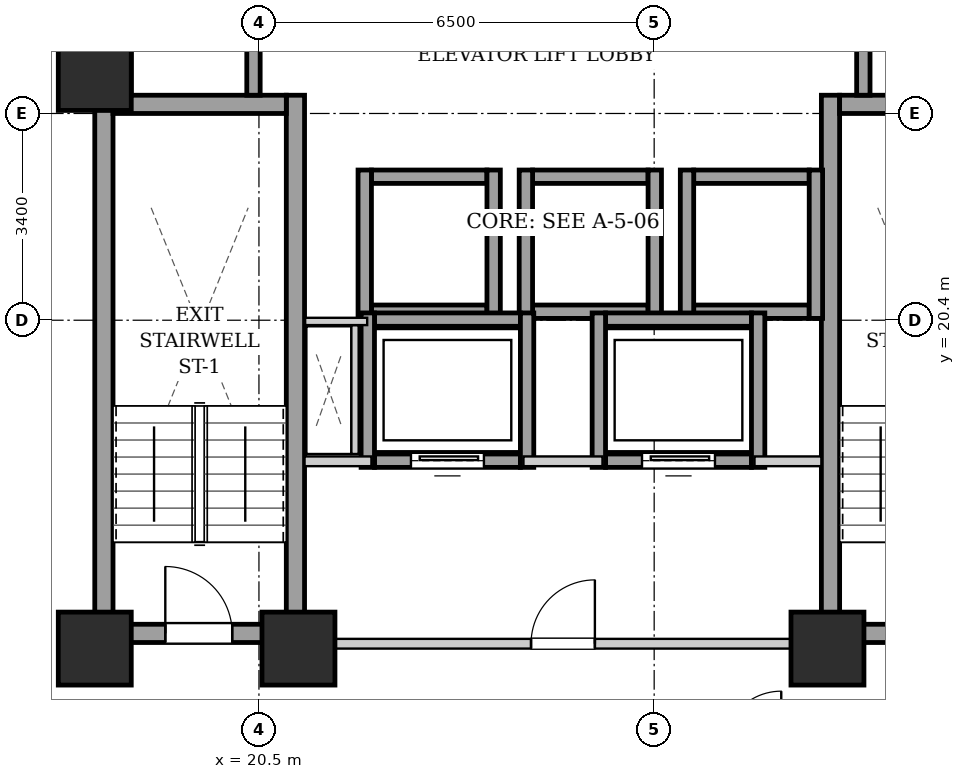
"""IFC4 building model, lengths in metres.
Left out: names, types, materials, properties, quantities, classifications, styles, units other than length and angle.
Written with IfcOpenShell. Run it as: python <this file> out.ifc"""

import sys

from ifc_helpers import new_model, si_unit, direction, frame, frame_2d, origin, origin_2d, place, context, subcontext, project, spatial, rectangle, extrude, element, fill, save


model = new_model("IFC4")
c1 = context("Model", 3, precision=1e-05, world=origin(), true_north=direction((0.0, 1.0)))
c2 = subcontext(c1, "Body", "Model", "MODEL_VIEW")
j1 = project(units=[si_unit("LENGTHUNIT", "METRE"), si_unit("PLANEANGLEUNIT", "RADIAN")], contexts=[c1])
p1 = place(None, origin())
s1 = spatial("IfcSite", under=j1, at=p1, CompositionType="ELEMENT")
p2 = place(p1, origin())
s2 = spatial("IfcBuilding", under=s1, at=p2, CompositionType="ELEMENT")
p3 = place(p2, frame((0.0, 0.0, 54.6)))
s3 = spatial("IfcBuildingStorey", under=s2, at=p3, CompositionType="ELEMENT", Elevation=54.6)
for number, where, z_axis, x_axis in (
    (1, (17.8, 15.0, 0.0), (0.0, 0.0, 1.0), (1.0, 0.0, 0.0)),
    (2, (21.15, 15.0, 0.0), (0.0, 0.0, 1.0), (1.0, 0.0, 0.0)),
    (3, (29.85, 15.0, 0.0), (0.0, 0.0, 1.0), (1.0, 0.0, 0.0)),
    (4, (17.8, 24.45, 0.0), (0.0, 0.0, 1.0), (1.0, 0.0, 0.0)),
):
    element("IfcColumn", number, at=place(p3, frame(where, z_axis=z_axis, x_axis=x_axis)), inside=s3, PredefinedType="COLUMN", context=c2, shape_type="SweptSolid", body=[
        extrude(rectangle(XDim=1.2, YDim=1.2, at=origin_2d()), origin(), (0.0, 0.0, 1.0), 3.2),
    ])
for number, where, z_axis, x_axis in (
    (5, (17.95, 15.1, 0.0), (0.0, 0.0, 1.0), (0.0, 1.0, 0.0)),
    (6, (21.1, 15.1, 0.0), (0.0, 0.0, 1.0), (0.0, 1.0, 0.0)),
):
    element("IfcWall", number, at=place(p3, frame(where, z_axis=z_axis, x_axis=x_axis)), inside=s3, PredefinedType="SHEAR", context=c2, shape_type="SweptSolid", body=[
        extrude(rectangle(XDim=9.0, YDim=0.3, at=frame_2d((4.5, 0.0))), origin(), (0.0, 0.0, 1.0), 2.94),
    ])
p4 = place(p3, frame((18.1, 23.95, 0.0), z_axis=(0.0, 0.0, 1.0), x_axis=(1.0, 0.0, 0.0)))
e7 = element("IfcWall", 7, at=p4, inside=s3, PredefinedType="SHEAR", context=c2, shape_type="SweptSolid", body=[
    extrude(rectangle(XDim=2.85, YDim=0.3, at=frame_2d((1.425, 0.0))), origin(), (0.0, 0.0, 1.0), 2.94),
])
p5 = place(p3, frame((18.1, 15.25, 0.0), z_axis=(0.0, 0.0, 1.0), x_axis=(1.0, 0.0, 0.0)))
e8 = element("IfcWall", 8, at=p5, inside=s3, PredefinedType="SHEAR", context=c2, shape_type="SweptSolid", body=[
    extrude(rectangle(XDim=2.85, YDim=0.3, at=frame_2d((1.425, 0.0))), origin(), (0.0, 0.0, 1.0), 2.94),
])
p6 = place(p5, frame((0.86, 0.0, 0.0)))
e9 = element("IfcOpeningElement", 9, at=p6, cuts=e8, PredefinedType="OPENING", context=c2, shape_type="SweptSolid", body=[
    extrude(rectangle(XDim=1.1, YDim=2.05, at=frame_2d((0.55, 1.025))), frame((0.0, 0.16, 0.0), z_axis=(0.0, -1.0, 0.0), x_axis=(1.0, 0.0, 0.0)), (0.0, 0.0, 1.0), 0.32),
])
p7 = place(p3, frame((29.9, 15.1, 0.0), z_axis=(0.0, 0.0, 1.0), x_axis=(0.0, 1.0, 0.0)))
e10 = element("IfcWall", 10, at=p7, inside=s3, PredefinedType="SHEAR", context=c2, shape_type="SweptSolid", body=[
    extrude(rectangle(XDim=9.0, YDim=0.3, at=frame_2d((4.5, 0.0))), origin(), (0.0, 0.0, 1.0), 2.94),
])
p8 = place(p3, frame((30.05, 23.95, 0.0), z_axis=(0.0, 0.0, 1.0), x_axis=(1.0, 0.0, 0.0)))
e11 = element("IfcWall", 11, at=p8, inside=s3, PredefinedType="SHEAR", context=c2, shape_type="SweptSolid", body=[
    extrude(rectangle(XDim=2.85, YDim=0.3, at=frame_2d((1.425, 0.0))), origin(), (0.0, 0.0, 1.0), 2.94),
])
p9 = place(p3, frame((30.05, 15.25, 0.0), z_axis=(0.0, 0.0, 1.0), x_axis=(1.0, 0.0, 0.0)))
e12 = element("IfcWall", 12, at=p9, inside=s3, PredefinedType="SHEAR", context=c2, shape_type="SweptSolid", body=[
    extrude(rectangle(XDim=2.85, YDim=0.3, at=frame_2d((1.425, 0.0))), origin(), (0.0, 0.0, 1.0), 2.94),
])
p10 = place(p9, frame((0.86, 0.0, 0.0)))
e13 = element("IfcOpeningElement", 13, at=p10, cuts=e12, PredefinedType="OPENING", context=c2, shape_type="SweptSolid", body=[
    extrude(rectangle(XDim=1.1, YDim=2.05, at=frame_2d((0.55, 1.025))), frame((0.0, 0.16, 0.0), z_axis=(0.0, -1.0, 0.0), x_axis=(1.0, 0.0, 0.0)), (0.0, 0.0, 1.0), 0.32),
])
for number, where, z_axis, x_axis in (
    (14, (22.35, 20.54, 0.0), (0.0, 0.0, 1.0), (1.0, 0.0, 0.0)),
    (15, (22.35, 22.76, 0.0), (0.0, 0.0, 1.0), (1.0, 0.0, 0.0)),
):
    element("IfcWall", number, at=place(p3, frame(where, z_axis=z_axis, x_axis=x_axis)), inside=s3, PredefinedType="SHEAR", context=c2, shape_type="SweptSolid", body=[
        extrude(rectangle(XDim=1.9, YDim=0.22, at=frame_2d((0.95, 0.0))), origin(), (0.0, 0.0, 1.0), 2.94),
    ])
for number, where, z_axis, x_axis in (
    (16, (22.24, 20.43, 0.0), (0.0, 0.0, 1.0), (0.0, 1.0, 0.0)),
    (17, (24.36, 20.43, 0.0), (0.0, 0.0, 1.0), (0.0, 1.0, 0.0)),
):
    element("IfcWall", number, at=place(p3, frame(where, z_axis=z_axis, x_axis=x_axis)), inside=s3, PredefinedType="SHEAR", context=c2, shape_type="SweptSolid", body=[
        extrude(rectangle(XDim=2.44, YDim=0.22, at=frame_2d((1.22, 0.0))), origin(), (0.0, 0.0, 1.0), 2.94),
    ])
for number, where, z_axis, x_axis in (
    (18, (25.0, 20.54, 0.0), (0.0, 0.0, 1.0), (1.0, 0.0, 0.0)),
    (19, (25.0, 22.76, 0.0), (0.0, 0.0, 1.0), (1.0, 0.0, 0.0)),
):
    element("IfcWall", number, at=place(p3, frame(where, z_axis=z_axis, x_axis=x_axis)), inside=s3, PredefinedType="SHEAR", context=c2, shape_type="SweptSolid", body=[
        extrude(rectangle(XDim=1.9, YDim=0.22, at=frame_2d((0.95, 0.0))), origin(), (0.0, 0.0, 1.0), 2.94),
    ])
for number, where, z_axis, x_axis in (
    (20, (24.89, 20.43, 0.0), (0.0, 0.0, 1.0), (0.0, 1.0, 0.0)),
    (21, (27.01, 20.43, 0.0), (0.0, 0.0, 1.0), (0.0, 1.0, 0.0)),
):
    element("IfcWall", number, at=place(p3, frame(where, z_axis=z_axis, x_axis=x_axis)), inside=s3, PredefinedType="SHEAR", context=c2, shape_type="SweptSolid", body=[
        extrude(rectangle(XDim=2.44, YDim=0.22, at=frame_2d((1.22, 0.0))), origin(), (0.0, 0.0, 1.0), 2.94),
    ])
for number, where, z_axis, x_axis in (
    (22, (27.65, 20.54, 0.0), (0.0, 0.0, 1.0), (1.0, 0.0, 0.0)),
    (23, (27.65, 22.76, 0.0), (0.0, 0.0, 1.0), (1.0, 0.0, 0.0)),
):
    element("IfcWall", number, at=place(p3, frame(where, z_axis=z_axis, x_axis=x_axis)), inside=s3, PredefinedType="SHEAR", context=c2, shape_type="SweptSolid", body=[
        extrude(rectangle(XDim=1.9, YDim=0.22, at=frame_2d((0.95, 0.0))), origin(), (0.0, 0.0, 1.0), 2.94),
    ])
for number, where, z_axis, x_axis in (
    (24, (27.54, 20.43, 0.0), (0.0, 0.0, 1.0), (0.0, 1.0, 0.0)),
    (25, (29.66, 20.43, 0.0), (0.0, 0.0, 1.0), (0.0, 1.0, 0.0)),
):
    element("IfcWall", number, at=place(p3, frame(where, z_axis=z_axis, x_axis=x_axis)), inside=s3, PredefinedType="SHEAR", context=c2, shape_type="SweptSolid", body=[
        extrude(rectangle(XDim=2.44, YDim=0.22, at=frame_2d((1.22, 0.0))), origin(), (0.0, 0.0, 1.0), 2.94),
    ])
p11 = place(p3, frame((18.29, 24.1, 0.0), z_axis=(0.0, 0.0, 1.0), x_axis=(0.0, 1.0, 0.0)))
e26 = element("IfcWall", 26, at=p11, inside=s3, PredefinedType="SHEAR", context=c2, shape_type="SweptSolid", body=[
    extrude(rectangle(XDim=4.14, YDim=0.22, at=frame_2d((2.07, 0.0))), origin(), (0.0, 0.0, 1.0), 2.94),
])
p12 = place(p3, frame((20.41, 24.1, 0.0), z_axis=(0.0, 0.0, 1.0), x_axis=(0.0, 1.0, 0.0)))
e27 = element("IfcWall", 27, at=p12, inside=s3, PredefinedType="SHEAR", context=c2, shape_type="SweptSolid", body=[
    extrude(rectangle(XDim=1.96, YDim=0.22, at=frame_2d((0.98, 0.0))), origin(), (0.0, 0.0, 1.0), 2.94),
])
p13 = place(p3, frame((30.44, 24.1, 0.0), z_axis=(0.0, 0.0, 1.0), x_axis=(0.0, 1.0, 0.0)))
e28 = element("IfcWall", 28, at=p13, inside=s3, PredefinedType="SHEAR", context=c2, shape_type="SweptSolid", body=[
    extrude(rectangle(XDim=2.07, YDim=0.22, at=frame_2d((1.035, 0.0))), origin(), (0.0, 0.0, 1.0), 2.94),
])
p14 = place(p3, frame((22.4, 18.09, 0.0), z_axis=(0.0, 0.0, 1.0), x_axis=(1.0, 0.0, 0.0)))
e29 = element("IfcWall", 29, at=p14, inside=s3, PredefinedType="SHEAR", context=c2, shape_type="SweptSolid", body=[
    extrude(rectangle(XDim=2.4, YDim=0.22, at=frame_2d((1.2, 0.0))), origin(), (0.0, 0.0, 1.0), 2.94),
])
p15 = place(p14, frame((0.6, 0.0, 0.0)))
e30 = element("IfcOpeningElement", 30, at=p15, cuts=e29, PredefinedType="OPENING", context=c2, shape_type="SweptSolid", body=[
    extrude(rectangle(XDim=1.2, YDim=2.15, at=frame_2d((0.6, 1.075))), frame((0.0, 0.12, 0.0), z_axis=(0.0, -1.0, 0.0), x_axis=(1.0, 0.0, 0.0)), (0.0, 0.0, 1.0), 0.24),
])
p16 = place(p3, frame((22.4, 20.41, 0.0), z_axis=(0.0, 0.0, 1.0), x_axis=(1.0, 0.0, 0.0)))
e31 = element("IfcWall", 31, at=p16, inside=s3, PredefinedType="SHEAR", context=c2, shape_type="SweptSolid", body=[
    extrude(rectangle(XDim=2.4, YDim=0.22, at=frame_2d((1.2, 0.0))), origin(), (0.0, 0.0, 1.0), 2.94),
])
for number, where, z_axis, x_axis in (
    (32, (22.29, 17.98, 0.0), (0.0, 0.0, 1.0), (0.0, 1.0, 0.0)),
    (33, (24.91, 17.98, 0.0), (0.0, 0.0, 1.0), (0.0, 1.0, 0.0)),
):
    element("IfcWall", number, at=place(p3, frame(where, z_axis=z_axis, x_axis=x_axis)), inside=s3, PredefinedType="SHEAR", context=c2, shape_type="SweptSolid", body=[
        extrude(rectangle(XDim=2.54, YDim=0.22, at=frame_2d((1.27, 0.0))), origin(), (0.0, 0.0, 1.0), 2.94),
    ])
p17 = place(p3, frame((26.2, 18.09, 0.0), z_axis=(0.0, 0.0, 1.0), x_axis=(1.0, 0.0, 0.0)))
e34 = element("IfcWall", 34, at=p17, inside=s3, PredefinedType="SHEAR", context=c2, shape_type="SweptSolid", body=[
    extrude(rectangle(XDim=2.4, YDim=0.22, at=frame_2d((1.2, 0.0))), origin(), (0.0, 0.0, 1.0), 2.94),
])
p18 = place(p17, frame((0.6, 0.0, 0.0)))
e35 = element("IfcOpeningElement", 35, at=p18, cuts=e34, PredefinedType="OPENING", context=c2, shape_type="SweptSolid", body=[
    extrude(rectangle(XDim=1.2, YDim=2.15, at=frame_2d((0.6, 1.075))), frame((0.0, 0.12, 0.0), z_axis=(0.0, -1.0, 0.0), x_axis=(1.0, 0.0, 0.0)), (0.0, 0.0, 1.0), 0.24),
])
p19 = place(p3, frame((26.2, 20.41, 0.0), z_axis=(0.0, 0.0, 1.0), x_axis=(1.0, 0.0, 0.0)))
e36 = element("IfcWall", 36, at=p19, inside=s3, PredefinedType="SHEAR", context=c2, shape_type="SweptSolid", body=[
    extrude(rectangle(XDim=2.4, YDim=0.22, at=frame_2d((1.2, 0.0))), origin(), (0.0, 0.0, 1.0), 2.94),
])
for number, where, z_axis, x_axis in (
    (37, (26.09, 17.98, 0.0), (0.0, 0.0, 1.0), (0.0, 1.0, 0.0)),
    (38, (28.71, 17.98, 0.0), (0.0, 0.0, 1.0), (0.0, 1.0, 0.0)),
):
    element("IfcWall", number, at=place(p3, frame(where, z_axis=z_axis, x_axis=x_axis)), inside=s3, PredefinedType="SHEAR", context=c2, shape_type="SweptSolid", body=[
        extrude(rectangle(XDim=2.54, YDim=0.22, at=frame_2d((1.27, 0.0))), origin(), (0.0, 0.0, 1.0), 2.94),
    ])
p20 = place(p3, frame((21.25, 15.08, 0.0), z_axis=(0.0, 0.0, 1.0), x_axis=(1.0, 0.0, 0.0)))
e39 = element("IfcWall", 39, at=p20, inside=s3, PredefinedType="PARTITIONING", context=c2, shape_type="SweptSolid", body=[
    extrude(rectangle(XDim=8.5, YDim=0.16, at=frame_2d((4.25, 0.0))), origin(), (0.0, 0.0, 1.0), 2.232),
])
p21 = place(p20, frame((3.725, 0.0, 0.0)))
e40 = element("IfcOpeningElement", 40, at=p21, cuts=e39, PredefinedType="OPENING", context=c2, shape_type="SweptSolid", body=[
    extrude(rectangle(XDim=1.05, YDim=2.05, at=frame_2d((0.525, 1.025))), frame((0.0, 0.09, 0.0), z_axis=(0.0, -1.0, 0.0), x_axis=(1.0, 0.0, 0.0)), (0.0, 0.0, 1.0), 0.18),
])
p22 = place(p3, frame((21.25, 18.08, 0.0), z_axis=(0.0, 0.0, 1.0), x_axis=(1.0, 0.0, 0.0)))
e41 = element("IfcWall", 41, at=p22, inside=s3, PredefinedType="PARTITIONING", context=c2, shape_type="SweptSolid", body=[
    extrude(rectangle(XDim=1.1, YDim=0.16, at=frame_2d((0.55, 0.0))), origin(), (0.0, 0.0, 1.0), 2.94),
])
p23 = place(p3, frame((24.85, 18.08, 0.0), z_axis=(0.0, 0.0, 1.0), x_axis=(1.0, 0.0, 0.0)))
e42 = element("IfcWall", 42, at=p23, inside=s3, PredefinedType="PARTITIONING", context=c2, shape_type="SweptSolid", body=[
    extrude(rectangle(XDim=1.3, YDim=0.16, at=frame_2d((0.65, 0.0))), origin(), (0.0, 0.0, 1.0), 2.94),
])
p24 = place(p3, frame((28.65, 18.08, 0.0), z_axis=(0.0, 0.0, 1.0), x_axis=(1.0, 0.0, 0.0)))
e43 = element("IfcWall", 43, at=p24, inside=s3, PredefinedType="PARTITIONING", context=c2, shape_type="SweptSolid", body=[
    extrude(rectangle(XDim=1.1, YDim=0.16, at=frame_2d((0.55, 0.0))), origin(), (0.0, 0.0, 1.0), 2.94),
])
p25 = place(p3, frame((17.88, 24.12, 0.0), z_axis=(0.0, 0.0, 1.0), x_axis=(0.0, 1.0, 0.0)))
e44 = element("IfcWall", 44, at=p25, inside=s3, PredefinedType="PARTITIONING", context=c2, shape_type="SweptSolid", body=[
    extrude(rectangle(XDim=4.76, YDim=0.16, at=frame_2d((2.38, 0.0))), origin(), (0.0, 0.0, 1.0), 2.94),
])
p26 = place(p3, frame((22.08, 18.2, 0.0), z_axis=(0.0, 0.0, 1.0), x_axis=(0.0, 1.0, 0.0)))
e45 = element("IfcWall", 45, at=p26, inside=s3, PredefinedType="PARTITIONING", context=c2, shape_type="SweptSolid", body=[
    extrude(rectangle(XDim=2.12, YDim=0.12, at=frame_2d((1.06, 0.0))), origin(), (0.0, 0.0, 1.0), 2.94),
])
p27 = place(p3, frame((22.28, 20.38, 0.0), z_axis=(0.0, 0.0, 1.0), x_axis=(-1.0, 0.0, 0.0)))
e46 = element("IfcWall", 46, at=p27, inside=s3, PredefinedType="PARTITIONING", context=c2, shape_type="SweptSolid", body=[
    extrude(rectangle(XDim=1.02, YDim=0.12, at=frame_2d((0.51, 0.0))), origin(), (0.0, 0.0, 1.0), 2.94),
])
p28 = place(p6, origin())
e47 = element("IfcDoor", 47, at=p28, inside=s3, OperationType="SINGLE_SWING_LEFT", PredefinedType="DOOR", context=c2, shape_type="SweptSolid", body=[
    extrude(rectangle(XDim=1.1, YDim=2.05, at=frame_2d((0.55, 1.025))), frame((0.0, 0.025, 0.0), z_axis=(0.0, -1.0, 0.0), x_axis=(1.0, 0.0, 0.0)), (0.0, 0.0, 1.0), 0.05),
])
fill(e9, e47)
p29 = place(p15, origin())
e48 = element("IfcDoor", 48, at=p29, inside=s3, OperationType="SLIDING_TO_LEFT", PredefinedType="DOOR", context=c2, shape_type="SweptSolid", body=[
    extrude(rectangle(XDim=1.2, YDim=2.15, at=frame_2d((0.6, 1.075))), frame((0.0, 0.025, 0.0), z_axis=(0.0, -1.0, 0.0), x_axis=(1.0, 0.0, 0.0)), (0.0, 0.0, 1.0), 0.05),
])
fill(e30, e48)
p30 = place(p18, origin())
e49 = element("IfcDoor", 49, at=p30, inside=s3, OperationType="SLIDING_TO_LEFT", PredefinedType="DOOR", context=c2, shape_type="SweptSolid", body=[
    extrude(rectangle(XDim=1.2, YDim=2.15, at=frame_2d((0.6, 1.075))), frame((0.0, 0.025, 0.0), z_axis=(0.0, -1.0, 0.0), x_axis=(1.0, 0.0, 0.0)), (0.0, 0.0, 1.0), 0.05),
])
fill(e35, e49)
p31 = place(p21, origin())
e50 = element("IfcDoor", 50, at=p31, inside=s3, OperationType="SINGLE_SWING_RIGHT", PredefinedType="DOOR", context=c2, shape_type="SweptSolid", body=[
    extrude(rectangle(XDim=1.05, YDim=2.05, at=frame_2d((0.525, 1.025))), frame((0.0, 0.025, 0.0), z_axis=(0.0, -1.0, 0.0), x_axis=(1.0, 0.0, 0.0)), (0.0, 0.0, 1.0), 0.05),
])
fill(e40, e50)
save(model, sys.argv[1])
